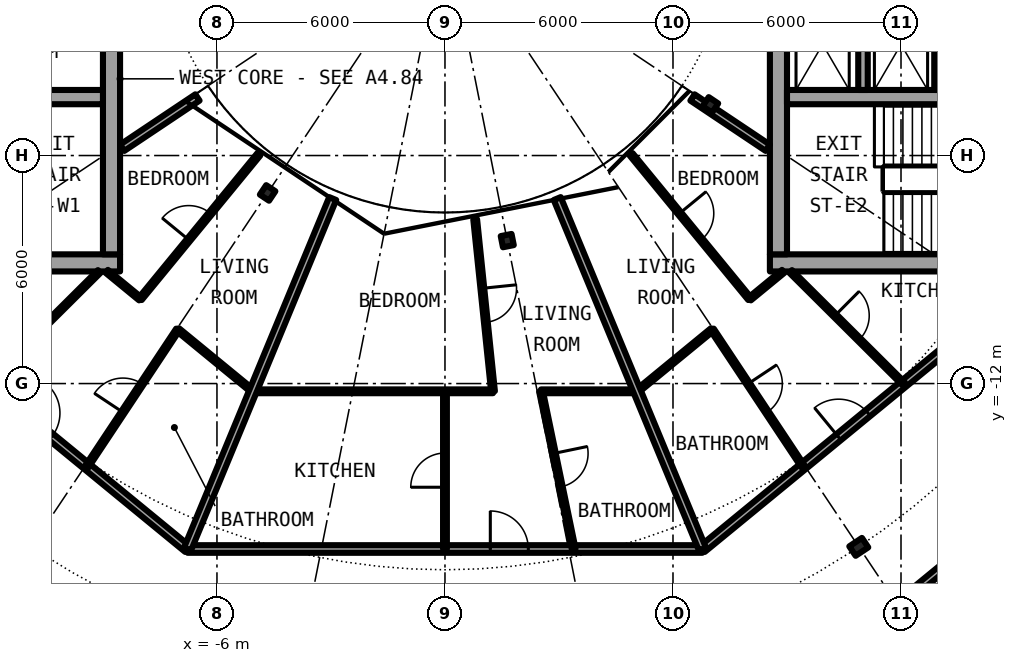
"""IFC4 building model, lengths in metres.
Left out: names, types, materials, properties, quantities, classifications, styles, units other than length and angle.
Written with IfcOpenShell. Run it as: python <this file> out.ifc"""

import sys

from ifc_helpers import new_model, si_unit, direction, frame, frame_2d, origin, origin_2d, place, context, subcontext, project, spatial, rectangle, i_section, extrude, element, fill, save


model = new_model("IFC4")
c1 = context("Model", 3, precision=1e-05, world=origin(), true_north=direction((0.0, 1.0)))
c2 = subcontext(c1, "Body", "Model", "MODEL_VIEW")
j1 = project(units=[si_unit("LENGTHUNIT", "METRE"), si_unit("PLANEANGLEUNIT", "RADIAN")], contexts=[c1])
p1 = place(None, origin())
s1 = spatial("IfcSite", under=j1, at=p1, CompositionType="ELEMENT")
p2 = place(p1, origin())
s2 = spatial("IfcBuilding", under=s1, at=p2, CompositionType="ELEMENT")
p3 = place(p2, frame((0.0, 0.0, 196.3)))
s3 = spatial("IfcBuildingStorey", under=s2, at=p3, CompositionType="ELEMENT", Elevation=196.3)
p4 = place(p3, frame((10.889, -16.297, 0.0), z_axis=(0.0, 0.0, 1.0), x_axis=(0.55557023302, -0.831469612303, 0.0)))
e1 = element("IfcColumn", 1, at=p4, inside=s3, PredefinedType="COLUMN", context=c2, shape_type="SweptSolid", body=[
    extrude(i_section(OverallWidth=0.3, OverallDepth=0.4, WebThickness=0.013, FlangeThickness=0.024, FilletRadius=0.027, at=origin_2d()), origin(), (0.0, 0.0, 1.0), 3.05),
])
for number, where, z_axis, x_axis in (
    (2, (-4.667, -6.984, 0.0), (0.0, 0.0, 1.0), (-0.556, -0.831, 0.0)),
    (3, (1.639, -8.239, 0.0), (0.0, 0.0, 1.0), (0.195, -0.981, 0.0)),
    (4, (6.984, -4.667, 0.0), (0.0, 0.0, 1.0), (0.831, -0.556, 0.0)),
):
    element("IfcColumn", number, at=place(p3, frame(where, z_axis=z_axis, x_axis=x_axis)), inside=s3, PredefinedType="COLUMN", context=c2, shape_type="SweptSolid", body=[
        extrude(i_section(OverallWidth=0.3, OverallDepth=0.29, WebThickness=0.009, FlangeThickness=0.014, FilletRadius=0.027, at=origin_2d()), origin(), (0.0, 0.0, 1.0), 3.05),
    ])
p5 = place(p3, frame((8.55, -8.825, 0.0), z_axis=(0.0, 0.0, 1.0), x_axis=(1.0, 0.0, 0.0)))
e5 = element("IfcWall", 5, at=p5, inside=s3, PredefinedType="SHEAR", context=c2, shape_type="SweptSolid", body=[
    extrude(rectangle(XDim=13.5, YDim=0.45, at=frame_2d((6.75, 0.0))), origin(), (0.0, 0.0, 1.0), 3.05),
])
p6 = place(p5, frame((11.325, 0.0, 0.0)))
e6 = element("IfcOpeningElement", 6, at=p6, cuts=e5, PredefinedType="OPENING", context=c2, shape_type="SweptSolid", body=[
    extrude(rectangle(XDim=1.2, YDim=2.3, at=frame_2d((0.6, 1.15))), frame((0.0, 0.235, 0.0), z_axis=(0.0, -1.0, 0.0), x_axis=(1.0, 0.0, 0.0)), (0.0, 0.0, 1.0), 0.47),
])
p7 = place(p3, frame((8.775, -8.6, 0.0), z_axis=(0.0, 0.0, 1.0), x_axis=(0.0, 1.0, 0.0)))
e7 = element("IfcWall", 7, at=p7, inside=s3, PredefinedType="SHEAR", context=c2, shape_type="SweptSolid", body=[
    extrude(rectangle(XDim=17.2, YDim=0.45, at=frame_2d((8.6, 0.0))), origin(), (0.0, 0.0, 1.0), 3.05),
])
p8 = place(p7, frame((7.4, 0.0, 0.1)))
e8 = element("IfcOpeningElement", 8, at=p8, cuts=e7, PredefinedType="OPENING", context=c2, shape_type="SweptSolid", body=[
    extrude(rectangle(XDim=2.4, YDim=2.2, at=frame_2d((1.2, 1.1))), frame((0.0, 0.235, 0.0), z_axis=(0.0, -1.0, 0.0), x_axis=(1.0, 0.0, 0.0)), (0.0, 0.0, 1.0), 0.47),
])
p9 = place(p3, frame((9.0, -4.462, 0.0), z_axis=(0.0, 0.0, 1.0), x_axis=(1.0, 0.0, 0.0)))
e9 = element("IfcWall", 9, at=p9, inside=s3, PredefinedType="SHEAR", context=c2, shape_type="SweptSolid", body=[
    extrude(rectangle(XDim=10.15, YDim=0.375, at=frame_2d((5.075, 0.0))), origin(), (0.0, 0.0, 1.0), 3.05),
])
for number, where, z_axis, x_axis in (
    (10, (11.0, -1.825, 0.0), (0.0, 0.0, 1.0), (0.0, -1.0, 0.0)),
    (11, (13.0, -1.825, 0.0), (0.0, 0.0, 1.0), (0.0, -1.0, 0.0)),
):
    element("IfcWall", number, at=place(p3, frame(where, z_axis=z_axis, x_axis=x_axis)), inside=s3, PredefinedType="SOLIDWALL", context=c2, shape_type="SweptSolid", body=[
        extrude(rectangle(XDim=2.45, YDim=0.25, at=frame_2d((1.225, 0.0))), origin(), (0.0, 0.0, 1.0), 2.7),
    ])
p10 = place(p3, frame((-22.05, -8.825, 0.0), z_axis=(0.0, 0.0, 1.0), x_axis=(1.0, 0.0, 0.0)))
e12 = element("IfcWall", 12, at=p10, inside=s3, PredefinedType="SHEAR", context=c2, shape_type="SweptSolid", body=[
    extrude(rectangle(XDim=13.5, YDim=0.45, at=frame_2d((6.75, 0.0))), origin(), (0.0, 0.0, 1.0), 3.05),
])
p11 = place(p10, frame((0.975, 0.0, 0.0)))
e13 = element("IfcOpeningElement", 13, at=p11, cuts=e12, PredefinedType="OPENING", context=c2, shape_type="SweptSolid", body=[
    extrude(rectangle(XDim=1.2, YDim=2.3, at=frame_2d((0.6, 1.15))), frame((0.0, 0.235, 0.0), z_axis=(0.0, -1.0, 0.0), x_axis=(1.0, 0.0, 0.0)), (0.0, 0.0, 1.0), 0.47),
])
p12 = place(p3, frame((-8.775, 8.6, 0.0), z_axis=(0.0, 0.0, 1.0), x_axis=(0.0, -1.0, 0.0)))
e14 = element("IfcWall", 14, at=p12, inside=s3, PredefinedType="SHEAR", context=c2, shape_type="SweptSolid", body=[
    extrude(rectangle(XDim=17.2, YDim=0.45, at=frame_2d((8.6, 0.0))), origin(), (0.0, 0.0, 1.0), 3.05),
])
p13 = place(p12, frame((7.4, 0.0, 0.1)))
e15 = element("IfcOpeningElement", 15, at=p13, cuts=e14, PredefinedType="OPENING", context=c2, shape_type="SweptSolid", body=[
    extrude(rectangle(XDim=2.4, YDim=2.2, at=frame_2d((1.2, 1.1))), frame((0.0, 0.235, 0.0), z_axis=(0.0, -1.0, 0.0), x_axis=(1.0, 0.0, 0.0)), (0.0, 0.0, 1.0), 0.47),
])
p14 = place(p3, frame((-9.0, -4.462, 0.0), z_axis=(0.0, 0.0, 1.0), x_axis=(-1.0, 0.0, 0.0)))
e16 = element("IfcWall", 16, at=p14, inside=s3, PredefinedType="SHEAR", context=c2, shape_type="SweptSolid", body=[
    extrude(rectangle(XDim=10.15, YDim=0.375, at=frame_2d((5.075, 0.0))), origin(), (0.0, 0.0, 1.0), 3.05),
])
p15 = place(p14, frame((6.6, 0.0, 0.0)))
e17 = element("IfcOpeningElement", 17, at=p15, cuts=e16, PredefinedType="OPENING", context=c2, shape_type="SweptSolid", body=[
    extrude(rectangle(XDim=1.1, YDim=2.3, at=frame_2d((0.55, 1.15))), frame((0.0, 0.198, 0.0), z_axis=(0.0, -1.0, 0.0), x_axis=(1.0, 0.0, 0.0)), (0.0, 0.0, 1.0), 0.395),
])
p16 = place(p3, frame((8.534, -20.603, 0.0), z_axis=(0.0, 0.0, 1.0), x_axis=(0.772983503654, 0.634426121056, 0.0)))
e18 = element("IfcWall", 18, at=p16, inside=s3, PredefinedType="PARTITIONING", context=c2, shape_type="SweptSolid", body=[
    extrude(rectangle(XDim=12.947, YDim=0.2, at=frame_2d((6.474, 0.0))), origin(), (0.0, 0.0, 1.0), 2.7),
])
p17 = place(p16, frame((7.053, 0.0, 0.0)))
e19 = element("IfcOpeningElement", 19, at=p17, cuts=e18, PredefinedType="OPENING", context=c2, shape_type="SweptSolid", body=[
    extrude(rectangle(XDim=1.0, YDim=2.3, at=frame_2d((0.5, 1.15))), frame((0.0, 0.11, 0.0), z_axis=(0.0, -1.0, 0.0), x_axis=(1.0, 0.0, 0.0)), (0.0, 0.0, 1.0), 0.22),
])
p18 = place(p3, frame((-14.717, -9.834, 0.0), z_axis=(0.0, 0.0, 1.0), x_axis=(0.773034536097, -0.634363938131, 0.0)))
e20 = element("IfcWall", 20, at=p18, inside=s3, PredefinedType="PARTITIONING", context=c2, shape_type="SweptSolid", body=[
    extrude(rectangle(XDim=10.277, YDim=0.2, at=frame_2d((5.138, 0.0))), origin(), (0.0, 0.0, 1.0), 2.7),
])
p19 = place(p18, frame((4.638, 0.0, 0.0)))
e21 = element("IfcOpeningElement", 21, at=p19, cuts=e20, PredefinedType="OPENING", context=c2, shape_type="SweptSolid", body=[
    extrude(rectangle(XDim=1.0, YDim=2.3, at=frame_2d((0.5, 1.15))), frame((0.0, 0.11, 0.0), z_axis=(0.0, -1.0, 0.0), x_axis=(1.0, 0.0, 0.0)), (0.0, 0.0, 1.0), 0.22),
])
p20 = place(p3, frame((6.773, -16.353, 0.0), z_axis=(0.0, 0.0, 1.0), x_axis=(0.773034536097, 0.634363938131, 0.0)))
e22 = element("IfcWall", 22, at=p20, inside=s3, PredefinedType="PARTITIONING", context=c2, shape_type="SweptSolid", body=[
    extrude(rectangle(XDim=10.277, YDim=0.2, at=frame_2d((5.138, 0.0))), origin(), (0.0, 0.0, 1.0), 2.7),
])
p21 = place(p20, frame((4.638, 0.0, 0.0)))
e23 = element("IfcOpeningElement", 23, at=p21, cuts=e22, PredefinedType="OPENING", context=c2, shape_type="SweptSolid", body=[
    extrude(rectangle(XDim=1.0, YDim=2.3, at=frame_2d((0.5, 1.15))), frame((0.0, 0.11, 0.0), z_axis=(0.0, -1.0, 0.0), x_axis=(1.0, 0.0, 0.0)), (0.0, 0.0, 1.0), 0.22),
])
p22 = place(p3, frame((-6.773, -16.353, 0.0), z_axis=(0.0, 0.0, 1.0), x_axis=(1.0, 0.0, 0.0)))
e24 = element("IfcWall", 24, at=p22, inside=s3, PredefinedType="PARTITIONING", context=c2, shape_type="SweptSolid", body=[
    extrude(rectangle(XDim=13.546, YDim=0.2, at=frame_2d((6.773, 0.0))), origin(), (0.0, 0.0, 1.0), 2.7),
])
p23 = place(p22, frame((7.966, 0.0, 0.0)))
e25 = element("IfcOpeningElement", 25, at=p23, cuts=e24, PredefinedType="OPENING", context=c2, shape_type="SweptSolid", body=[
    extrude(rectangle(XDim=1.0, YDim=2.3, at=frame_2d((0.5, 1.15))), frame((0.0, 0.11, 0.0), z_axis=(0.0, -1.0, 0.0), x_axis=(1.0, 0.0, 0.0)), (0.0, 0.0, 1.0), 0.22),
])
p24 = place(p3, frame((-8.901, -9.047, 0.0), z_axis=(0.0, 0.0, 1.0), x_axis=(0.772786083133, -0.634666581534, 0.0)))
e26 = element("IfcWall", 26, at=p24, inside=s3, PredefinedType="PARTITIONING", context=c2, shape_type="SweptSolid", body=[
    extrude(rectangle(XDim=1.144, YDim=0.1, at=frame_2d((0.572, 0.0))), origin(), (0.0, 0.0, 1.0), 2.7),
])
for number, where, z_axis, x_axis in (
    (27, (-7.031, -10.582, 0.0), (0.0, 0.0, 1.0), (0.773, -0.634, 0.0)),
    (28, (5.055, -12.204, 0.0), (0.0, 0.0, 1.0), (0.773, 0.634, 0.0)),
):
    element("IfcWall", number, at=place(p3, frame(where, z_axis=z_axis, x_axis=x_axis)), inside=s3, PredefinedType="PARTITIONING", context=c2, shape_type="SweptSolid", body=[
        extrude(rectangle(XDim=2.557, YDim=0.1, at=frame_2d((1.278, 0.0))), origin(), (0.0, 0.0, 1.0), 2.7),
    ])
p25 = place(p3, frame((8.017, -9.773, 0.0), z_axis=(0.0, 0.0, 1.0), x_axis=(0.772786083133, 0.634666581534, 0.0)))
e29 = element("IfcWall", 29, at=p25, inside=s3, PredefinedType="PARTITIONING", context=c2, shape_type="SweptSolid", body=[
    extrude(rectangle(XDim=1.144, YDim=0.1, at=frame_2d((0.572, 0.0))), origin(), (0.0, 0.0, 1.0), 2.7),
])
p26 = place(p3, frame((-5.055, -12.204, 0.0), z_axis=(0.0, 0.0, 1.0), x_axis=(1.0, 0.0, 0.0)))
e30 = element("IfcWall", 30, at=p26, inside=s3, PredefinedType="PARTITIONING", context=c2, shape_type="SweptSolid", body=[
    extrude(rectangle(XDim=6.319, YDim=0.1, at=frame_2d((3.159, 0.0))), origin(), (0.0, 0.0, 1.0), 2.7),
])
p27 = place(p3, frame((2.527, -12.204, 0.0), z_axis=(0.0, 0.0, 1.0), x_axis=(1.0, 0.0, 0.0)))
e31 = element("IfcWall", 31, at=p27, inside=s3, PredefinedType="PARTITIONING", context=c2, shape_type="SweptSolid", body=[
    extrude(rectangle(XDim=2.528, YDim=0.1, at=frame_2d((1.264, 0.0))), origin(), (0.0, 0.0, 1.0), 2.7),
])
for number, where, z_axis, x_axis in (
    (32, (-6.513, -4.472, 0.0), (0.0, 0.0, 1.0), (-0.831, -0.556, 0.0)),
    (33, (6.513, -4.472, 0.0), (0.0, 0.0, 1.0), (0.831, -0.556, 0.0)),
):
    element("IfcWall", number, at=place(p3, frame(where, z_axis=z_axis, x_axis=x_axis)), inside=s3, PredefinedType="PARTITIONING", context=c2, shape_type="SweptSolid", body=[
        extrude(rectangle(XDim=2.383, YDim=0.2, at=frame_2d((1.191, 0.0))), origin(), (0.0, 0.0, 1.0), 2.7),
    ])
p28 = place(p3, frame((-12.069, -12.007, 0.0), z_axis=(0.0, 0.0, 1.0), x_axis=(0.708909651863, 0.705299302067, 0.0)))
e34 = element("IfcWall", 34, at=p28, inside=s3, PredefinedType="PARTITIONING", context=c2, shape_type="SweptSolid", body=[
    extrude(rectangle(XDim=4.193, YDim=0.1, at=frame_2d((2.096, 0.0))), origin(), (0.0, 0.0, 1.0), 2.7),
])
p29 = place(p28, frame((1.646, 0.0, 0.0)))
e35 = element("IfcOpeningElement", 35, at=p29, cuts=e34, PredefinedType="OPENING", context=c2, shape_type="SweptSolid", body=[
    extrude(rectangle(XDim=0.9, YDim=2.3, at=frame_2d((0.45, 1.15))), frame((0.0, 0.06, 0.0), z_axis=(0.0, -1.0, 0.0), x_axis=(1.0, 0.0, 0.0)), (0.0, 0.0, 1.0), 0.12),
])
p30 = place(p3, frame((-9.421, -14.18, 0.0), z_axis=(0.0, 0.0, 1.0), x_axis=(0.553303732327, 0.832979579457, 0.0)))
e36 = element("IfcWall", 36, at=p30, inside=s3, PredefinedType="PARTITIONING", context=c2, shape_type="SweptSolid", body=[
    extrude(rectangle(XDim=4.319, YDim=0.1, at=frame_2d((2.16, 0.0))), origin(), (0.0, 0.0, 1.0), 2.7),
])
p31 = place(p30, frame((1.71, 0.0, 0.0)))
e37 = element("IfcOpeningElement", 37, at=p31, cuts=e36, PredefinedType="OPENING", context=c2, shape_type="SweptSolid", body=[
    extrude(rectangle(XDim=0.9, YDim=2.3, at=frame_2d((0.45, 1.15))), frame((0.0, 0.06, 0.0), z_axis=(0.0, -1.0, 0.0), x_axis=(1.0, 0.0, 0.0)), (0.0, 0.0, 1.0), 0.12),
])
p32 = place(p3, frame((-8.019, -9.771, 0.0), z_axis=(0.0, 0.0, 1.0), x_axis=(0.634401778971, 0.773003481776, 0.0)))
e38 = element("IfcWall", 38, at=p32, inside=s3, PredefinedType="PARTITIONING", context=c2, shape_type="SweptSolid", body=[
    extrude(rectangle(XDim=4.92, YDim=0.1, at=frame_2d((2.46, 0.0))), origin(), (0.0, 0.0, 1.0), 2.7),
])
p33 = place(p32, frame((2.01, 0.0, 0.0)))
e39 = element("IfcOpeningElement", 39, at=p33, cuts=e38, PredefinedType="OPENING", context=c2, shape_type="SweptSolid", body=[
    extrude(rectangle(XDim=0.9, YDim=2.3, at=frame_2d((0.45, 1.15))), frame((0.0, 0.06, 0.0), z_axis=(0.0, -1.0, 0.0), x_axis=(1.0, 0.0, 0.0)), (0.0, 0.0, 1.0), 0.12),
])
p34 = place(p3, frame((-6.774, -16.353, 0.0), z_axis=(0.0, 0.0, 1.0), x_axis=(0.382716169203, 0.92386597179, 0.0)))
e40 = element("IfcWall", 40, at=p34, inside=s3, PredefinedType="PARTITIONING", context=c2, shape_type="SweptSolid", body=[
    extrude(rectangle(XDim=9.981, YDim=0.2, at=frame_2d((4.99, 0.0))), origin(), (0.0, 0.0, 1.0), 2.7),
])
p35 = place(p3, frame((0.0, -16.353, 0.0), z_axis=(0.0, 0.0, 1.0), x_axis=(0.0, 1.0, 0.0)))
e41 = element("IfcWall", 41, at=p35, inside=s3, PredefinedType="PARTITIONING", context=c2, shape_type="SweptSolid", body=[
    extrude(rectangle(XDim=4.149, YDim=0.1, at=frame_2d((2.074, 0.0))), origin(), (0.0, 0.0, 1.0), 2.7),
])
p36 = place(p35, frame((1.625, 0.0, 0.0)))
e42 = element("IfcOpeningElement", 42, at=p36, cuts=e41, PredefinedType="OPENING", context=c2, shape_type="SweptSolid", body=[
    extrude(rectangle(XDim=0.9, YDim=2.3, at=frame_2d((0.45, 1.15))), frame((0.0, 0.06, 0.0), z_axis=(0.0, -1.0, 0.0), x_axis=(1.0, 0.0, 0.0)), (0.0, 0.0, 1.0), 0.12),
])
p37 = place(p3, frame((0.795, -7.679, 0.0), z_axis=(0.0, 0.0, 1.0), x_axis=(0.103089563582, -0.994672077561, 0.0)))
e43 = element("IfcWall", 43, at=p37, inside=s3, PredefinedType="PARTITIONING", context=c2, shape_type="SweptSolid", body=[
    extrude(rectangle(XDim=4.549, YDim=0.1, at=frame_2d((2.275, 0.0))), origin(), (0.0, 0.0, 1.0), 2.7),
])
p38 = place(p37, frame((1.825, 0.0, 0.0)))
e44 = element("IfcOpeningElement", 44, at=p38, cuts=e43, PredefinedType="OPENING", context=c2, shape_type="SweptSolid", body=[
    extrude(rectangle(XDim=0.9, YDim=2.3, at=frame_2d((0.45, 1.15))), frame((0.0, 0.06, 0.0), z_axis=(0.0, -1.0, 0.0), x_axis=(1.0, 0.0, 0.0)), (0.0, 0.0, 1.0), 0.12),
])
p39 = place(p3, frame((2.527, -12.204, 0.0), z_axis=(0.0, 0.0, 1.0), x_axis=(0.202937120105, -0.979191771454, 0.0)))
e45 = element("IfcWall", 45, at=p39, inside=s3, PredefinedType="PARTITIONING", context=c2, shape_type="SweptSolid", body=[
    extrude(rectangle(XDim=4.237, YDim=0.1, at=frame_2d((2.119, 0.0))), origin(), (0.0, 0.0, 1.0), 2.7),
])
p40 = place(p39, frame((1.669, 0.0, 0.0)))
e46 = element("IfcOpeningElement", 46, at=p40, cuts=e45, PredefinedType="OPENING", context=c2, shape_type="SweptSolid", body=[
    extrude(rectangle(XDim=0.9, YDim=2.3, at=frame_2d((0.45, 1.15))), frame((0.0, 0.06, 0.0), z_axis=(0.0, -1.0, 0.0), x_axis=(1.0, 0.0, 0.0)), (0.0, 0.0, 1.0), 0.12),
])
p41 = place(p3, frame((2.954, -7.132, 0.0), z_axis=(0.0, 0.0, 1.0), x_axis=(0.382716169203, -0.92386597179, 0.0)))
e47 = element("IfcWall", 47, at=p41, inside=s3, PredefinedType="PARTITIONING", context=c2, shape_type="SweptSolid", body=[
    extrude(rectangle(XDim=9.981, YDim=0.2, at=frame_2d((4.99, 0.0))), origin(), (0.0, 0.0, 1.0), 2.7),
])
p42 = place(p3, frame((4.898, -5.968, 0.0), z_axis=(0.0, 0.0, 1.0), x_axis=(0.634401778971, -0.773003481776, 0.0)))
e48 = element("IfcWall", 48, at=p42, inside=s3, PredefinedType="PARTITIONING", context=c2, shape_type="SweptSolid", body=[
    extrude(rectangle(XDim=4.92, YDim=0.1, at=frame_2d((2.46, 0.0))), origin(), (0.0, 0.0, 1.0), 2.7),
])
p43 = place(p42, frame((2.01, 0.0, 0.0)))
e49 = element("IfcOpeningElement", 49, at=p43, cuts=e48, PredefinedType="OPENING", context=c2, shape_type="SweptSolid", body=[
    extrude(rectangle(XDim=0.9, YDim=2.3, at=frame_2d((0.45, 1.15))), frame((0.0, 0.06, 0.0), z_axis=(0.0, -1.0, 0.0), x_axis=(1.0, 0.0, 0.0)), (0.0, 0.0, 1.0), 0.12),
])
p44 = place(p3, frame((7.031, -10.582, 0.0), z_axis=(0.0, 0.0, 1.0), x_axis=(0.553303732327, -0.832979579457, 0.0)))
e50 = element("IfcWall", 50, at=p44, inside=s3, PredefinedType="PARTITIONING", context=c2, shape_type="SweptSolid", body=[
    extrude(rectangle(XDim=4.319, YDim=0.1, at=frame_2d((2.16, 0.0))), origin(), (0.0, 0.0, 1.0), 2.7),
])
p45 = place(p44, frame((1.71, 0.0, 0.0)))
e51 = element("IfcOpeningElement", 51, at=p45, cuts=e50, PredefinedType="OPENING", context=c2, shape_type="SweptSolid", body=[
    extrude(rectangle(XDim=0.9, YDim=2.3, at=frame_2d((0.45, 1.15))), frame((0.0, 0.06, 0.0), z_axis=(0.0, -1.0, 0.0), x_axis=(1.0, 0.0, 0.0)), (0.0, 0.0, 1.0), 0.12),
])
p46 = place(p3, frame((9.097, -9.05, 0.0), z_axis=(0.0, 0.0, 1.0), x_axis=(0.708909651863, -0.705299302067, 0.0)))
e52 = element("IfcWall", 52, at=p46, inside=s3, PredefinedType="PARTITIONING", context=c2, shape_type="SweptSolid", body=[
    extrude(rectangle(XDim=4.193, YDim=0.1, at=frame_2d((2.096, 0.0))), origin(), (0.0, 0.0, 1.0), 2.7),
])
p47 = place(p46, frame((1.646, 0.0, 0.0)))
e53 = element("IfcOpeningElement", 53, at=p47, cuts=e52, PredefinedType="OPENING", context=c2, shape_type="SweptSolid", body=[
    extrude(rectangle(XDim=0.9, YDim=2.3, at=frame_2d((0.45, 1.15))), frame((0.0, 0.06, 0.0), z_axis=(0.0, -1.0, 0.0), x_axis=(1.0, 0.0, 0.0)), (0.0, 0.0, 1.0), 0.12),
])
p48 = place(p31, origin())
e54 = element("IfcDoor", 54, at=p48, inside=s3, OperationType="SINGLE_SWING_RIGHT", PredefinedType="DOOR", context=c2, shape_type="SweptSolid", body=[
    extrude(rectangle(XDim=0.9, YDim=2.3, at=frame_2d((0.45, 1.15))), frame((0.0, 0.025, 0.0), z_axis=(0.0, -1.0, 0.0), x_axis=(1.0, 0.0, 0.0)), (0.0, 0.0, 1.0), 0.05),
])
fill(e37, e54)
p49 = place(p29, origin())
e55 = element("IfcDoor", 55, at=p49, inside=s3, OperationType="SINGLE_SWING_LEFT", PredefinedType="DOOR", context=c2, shape_type="SweptSolid", body=[
    extrude(rectangle(XDim=0.9, YDim=2.3, at=frame_2d((0.45, 1.15))), frame((0.0, 0.025, 0.0), z_axis=(0.0, -1.0, 0.0), x_axis=(1.0, 0.0, 0.0)), (0.0, 0.0, 1.0), 0.05),
])
fill(e35, e55)
p50 = place(p33, origin())
e56 = element("IfcDoor", 56, at=p50, inside=s3, OperationType="SINGLE_SWING_LEFT", PredefinedType="DOOR", context=c2, shape_type="SweptSolid", body=[
    extrude(rectangle(XDim=0.9, YDim=2.3, at=frame_2d((0.45, 1.15))), frame((0.0, 0.025, 0.0), z_axis=(0.0, -1.0, 0.0), x_axis=(1.0, 0.0, 0.0)), (0.0, 0.0, 1.0), 0.05),
])
fill(e39, e56)
p51 = place(p23, origin())
e57 = element("IfcDoor", 57, at=p51, inside=s3, OperationType="SINGLE_SWING_RIGHT", PredefinedType="DOOR", context=c2, shape_type="SweptSolid", body=[
    extrude(rectangle(XDim=1.0, YDim=2.3, at=frame_2d((0.5, 1.15))), frame((0.0, 0.025, 0.0), z_axis=(0.0, -1.0, 0.0), x_axis=(1.0, 0.0, 0.0)), (0.0, 0.0, 1.0), 0.05),
])
fill(e25, e57)
p52 = place(p40, origin())
e58 = element("IfcDoor", 58, at=p52, inside=s3, OperationType="SINGLE_SWING_RIGHT", PredefinedType="DOOR", context=c2, shape_type="SweptSolid", body=[
    extrude(rectangle(XDim=0.9, YDim=2.3, at=frame_2d((0.45, 1.15))), frame((0.0, 0.025, 0.0), z_axis=(0.0, -1.0, 0.0), x_axis=(1.0, 0.0, 0.0)), (0.0, 0.0, 1.0), 0.05),
])
fill(e46, e58)
p53 = place(p36, origin())
e59 = element("IfcDoor", 59, at=p53, inside=s3, OperationType="SINGLE_SWING_RIGHT", PredefinedType="DOOR", context=c2, shape_type="SweptSolid", body=[
    extrude(rectangle(XDim=0.9, YDim=2.3, at=frame_2d((0.45, 1.15))), frame((0.0, 0.025, 0.0), z_axis=(0.0, -1.0, 0.0), x_axis=(1.0, 0.0, 0.0)), (0.0, 0.0, 1.0), 0.05),
])
fill(e42, e59)
p54 = place(p38, origin())
e60 = element("IfcDoor", 60, at=p54, inside=s3, OperationType="SINGLE_SWING_RIGHT", PredefinedType="DOOR", context=c2, shape_type="SweptSolid", body=[
    extrude(rectangle(XDim=0.9, YDim=2.3, at=frame_2d((0.45, 1.15))), frame((0.0, 0.025, 0.0), z_axis=(0.0, -1.0, 0.0), x_axis=(1.0, 0.0, 0.0)), (0.0, 0.0, 1.0), 0.05),
])
fill(e44, e60)
p55 = place(p21, origin())
e61 = element("IfcDoor", 61, at=p55, inside=s3, OperationType="SINGLE_SWING_RIGHT", PredefinedType="DOOR", context=c2, shape_type="SweptSolid", body=[
    extrude(rectangle(XDim=1.0, YDim=2.3, at=frame_2d((0.5, 1.15))), frame((0.0, 0.025, 0.0), z_axis=(0.0, -1.0, 0.0), x_axis=(1.0, 0.0, 0.0)), (0.0, 0.0, 1.0), 0.05),
])
fill(e23, e61)
p56 = place(p45, origin())
e62 = element("IfcDoor", 62, at=p56, inside=s3, OperationType="SINGLE_SWING_RIGHT", PredefinedType="DOOR", context=c2, shape_type="SweptSolid", body=[
    extrude(rectangle(XDim=0.9, YDim=2.3, at=frame_2d((0.45, 1.15))), frame((0.0, 0.025, 0.0), z_axis=(0.0, -1.0, 0.0), x_axis=(1.0, 0.0, 0.0)), (0.0, 0.0, 1.0), 0.05),
])
fill(e51, e62)
p57 = place(p47, origin())
e63 = element("IfcDoor", 63, at=p57, inside=s3, OperationType="SINGLE_SWING_RIGHT", PredefinedType="DOOR", context=c2, shape_type="SweptSolid", body=[
    extrude(rectangle(XDim=0.9, YDim=2.3, at=frame_2d((0.45, 1.15))), frame((0.0, 0.025, 0.0), z_axis=(0.0, -1.0, 0.0), x_axis=(1.0, 0.0, 0.0)), (0.0, 0.0, 1.0), 0.05),
])
fill(e53, e63)
p58 = place(p43, origin())
e64 = element("IfcDoor", 64, at=p58, inside=s3, OperationType="SINGLE_SWING_RIGHT", PredefinedType="DOOR", context=c2, shape_type="SweptSolid", body=[
    extrude(rectangle(XDim=0.9, YDim=2.3, at=frame_2d((0.45, 1.15))), frame((0.0, 0.025, 0.0), z_axis=(0.0, -1.0, 0.0), x_axis=(1.0, 0.0, 0.0)), (0.0, 0.0, 1.0), 0.05),
])
fill(e49, e64)
save(model, sys.argv[1])
